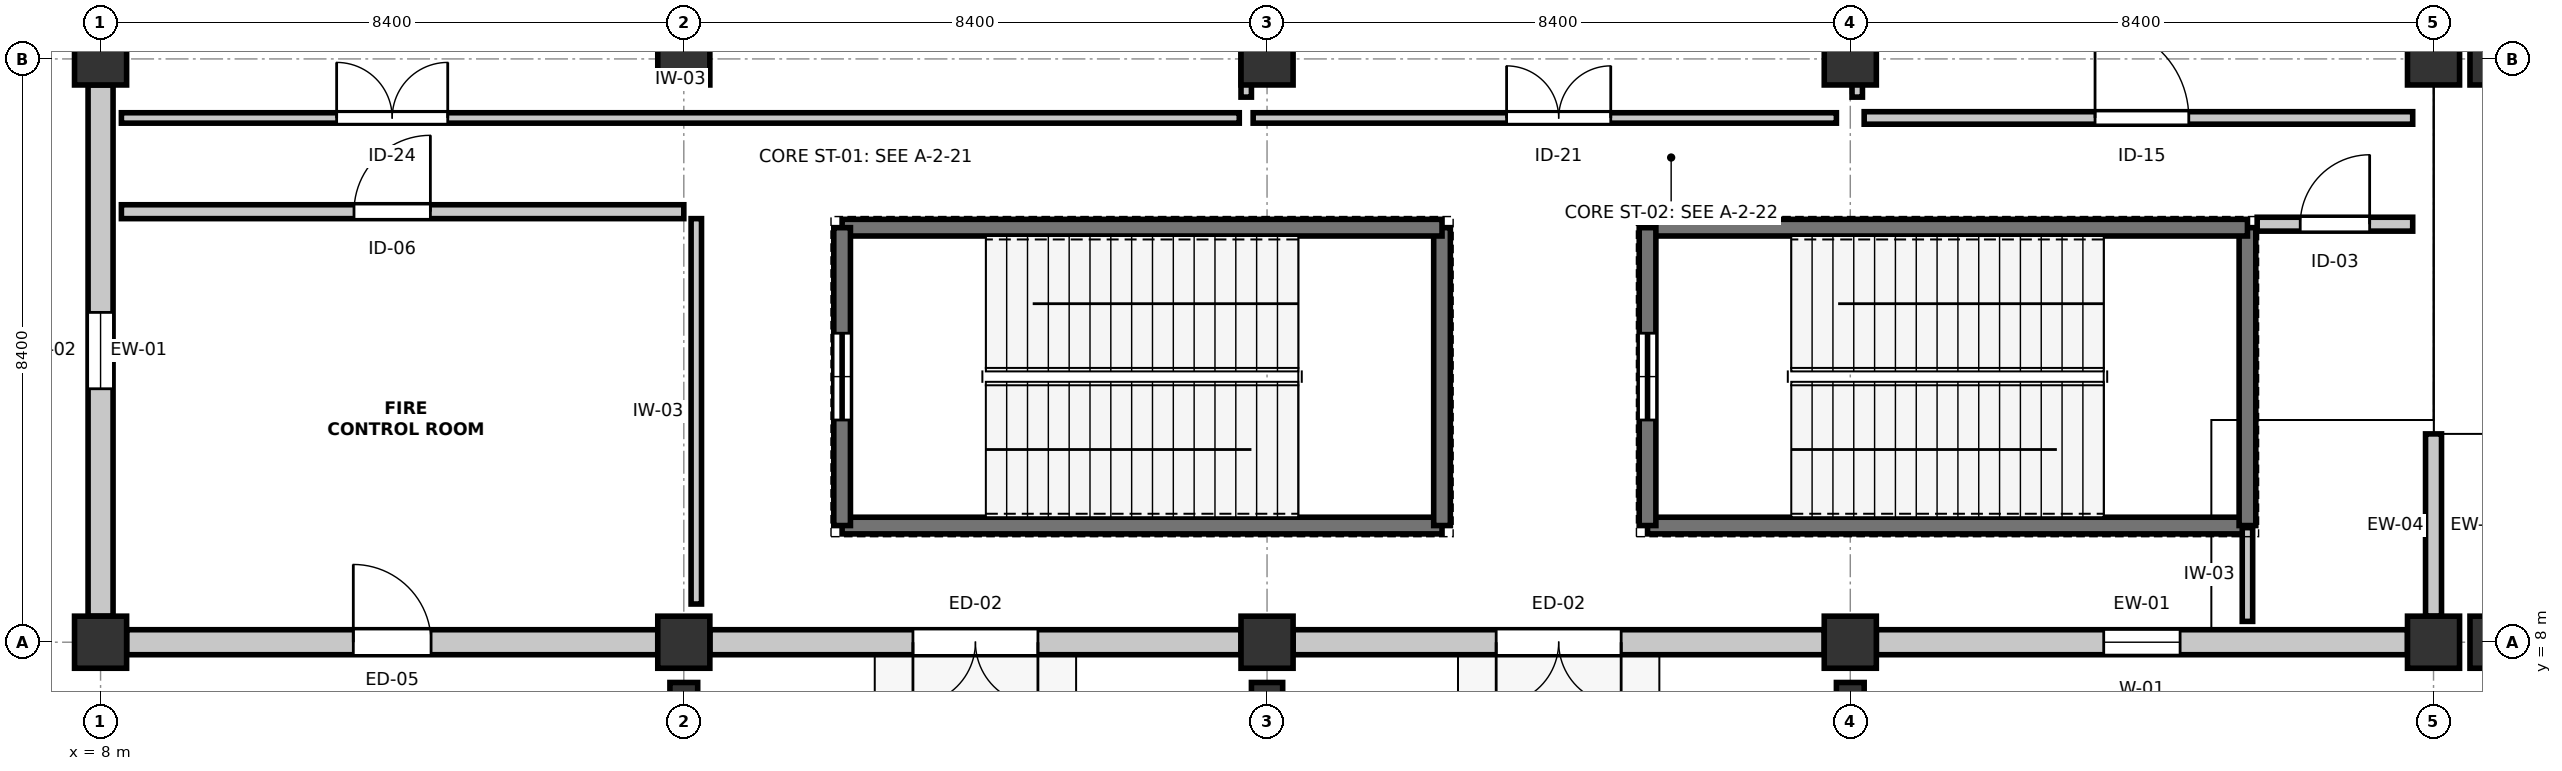
"""IFC4 building model, lengths in metres.
Left out: names, types, materials, properties, quantities, classifications, styles, units other than length and angle.
Written with IfcOpenShell. Run it as: python <this file> out.ifc"""

import sys

from ifc_helpers import new_model, si_unit, direction, frame, frame_2d, origin, origin_2d, place, context, subcontext, project, spatial, rectangle, extrude, element, fill, save


model = new_model("IFC4")
c1 = context("Model", 3, precision=1e-05, world=origin(), true_north=direction((0.0, 1.0)))
c2 = subcontext(c1, "Body", "Model", "MODEL_VIEW")
j1 = project(units=[si_unit("LENGTHUNIT", "METRE"), si_unit("PLANEANGLEUNIT", "RADIAN")], contexts=[c1])
p1 = place(None, origin())
s1 = spatial("IfcSite", under=j1, at=p1, CompositionType="ELEMENT")
p2 = place(p1, origin())
s2 = spatial("IfcBuilding", under=s1, at=p2, CompositionType="ELEMENT")
p3 = place(p2, origin())
s3 = spatial("IfcBuildingStorey", under=s2, at=p3, CompositionType="ELEMENT", Elevation=0.0)
for number, where, z_axis, x_axis in (
    (1, (8.0, 8.0, 0.0), (0.0, 0.0, 1.0), (1.0, 0.0, 0.0)),
    (2, (8.0, 16.4, 0.0), (0.0, 0.0, 1.0), (1.0, 0.0, 0.0)),
    (3, (16.4, 8.0, 0.0), (0.0, 0.0, 1.0), (1.0, 0.0, 0.0)),
):
    element("IfcColumn", number, at=place(p3, frame(where, z_axis=z_axis, x_axis=x_axis)), inside=s3, PredefinedType="COLUMN", context=c2, shape_type="SweptSolid", body=[
        extrude(rectangle(XDim=0.75, YDim=0.75, at=origin_2d()), origin(), (0.0, 0.0, 1.0), 4.8),
    ])
p4 = place(p3, frame((16.4, 7.095, 0.0), z_axis=(0.0, 0.0, 1.0), x_axis=(1.0, 0.0, 0.0)))
e4 = element("IfcColumn", 4, at=p4, inside=s3, PredefinedType="PILASTER", context=c2, shape_type="SweptSolid", body=[
    extrude(rectangle(XDim=0.4, YDim=0.65, at=origin_2d()), origin(), (0.0, 0.0, 1.0), 4.8),
])
for number, where, z_axis, x_axis in (
    (5, (16.4, 16.4, 0.0), (0.0, 0.0, 1.0), (1.0, 0.0, 0.0)),
    (6, (24.8, 8.0, 0.0), (0.0, 0.0, 1.0), (1.0, 0.0, 0.0)),
):
    element("IfcColumn", number, at=place(p3, frame(where, z_axis=z_axis, x_axis=x_axis)), inside=s3, PredefinedType="COLUMN", context=c2, shape_type="SweptSolid", body=[
        extrude(rectangle(XDim=0.75, YDim=0.75, at=origin_2d()), origin(), (0.0, 0.0, 1.0), 4.8),
    ])
p5 = place(p3, frame((24.8, 7.045, 0.0), z_axis=(0.0, 0.0, 1.0), x_axis=(1.0, 0.0, 0.0)))
e7 = element("IfcColumn", 7, at=p5, inside=s3, PredefinedType="PILASTER", context=c2, shape_type="SweptSolid", body=[
    extrude(rectangle(XDim=0.45, YDim=0.75, at=origin_2d()), origin(), (0.0, 0.0, 1.0), 4.8),
])
for number, where, z_axis, x_axis in (
    (8, (24.8, 16.4, 0.0), (0.0, 0.0, 1.0), (1.0, 0.0, 0.0)),
    (9, (33.2, 8.0, 0.0), (0.0, 0.0, 1.0), (1.0, 0.0, 0.0)),
):
    element("IfcColumn", number, at=place(p3, frame(where, z_axis=z_axis, x_axis=x_axis)), inside=s3, PredefinedType="COLUMN", context=c2, shape_type="SweptSolid", body=[
        extrude(rectangle(XDim=0.75, YDim=0.75, at=origin_2d()), origin(), (0.0, 0.0, 1.0), 4.8),
    ])
p6 = place(p3, frame((33.2, 7.095, 0.0), z_axis=(0.0, 0.0, 1.0), x_axis=(1.0, 0.0, 0.0)))
e10 = element("IfcColumn", 10, at=p6, inside=s3, PredefinedType="PILASTER", context=c2, shape_type="SweptSolid", body=[
    extrude(rectangle(XDim=0.4, YDim=0.65, at=origin_2d()), origin(), (0.0, 0.0, 1.0), 4.8),
])
for number, where, z_axis, x_axis in (
    (11, (33.2, 16.4, 0.0), (0.0, 0.0, 1.0), (1.0, 0.0, 0.0)),
    (12, (41.6, 8.0, 0.0), (0.0, 0.0, 1.0), (1.0, 0.0, 0.0)),
    (13, (41.6, 16.4, 0.0), (0.0, 0.0, 1.0), (1.0, 0.0, 0.0)),
    (14, (42.5, 8.0, 0.0), (0.0, 0.0, 1.0), (1.0, 0.0, 0.0)),
    (15, (42.5, 16.4, 0.0), (0.0, 0.0, 1.0), (1.0, 0.0, 0.0)),
):
    element("IfcColumn", number, at=place(p3, frame(where, z_axis=z_axis, x_axis=x_axis)), inside=s3, PredefinedType="COLUMN", context=c2, shape_type="SweptSolid", body=[
        extrude(rectangle(XDim=0.75, YDim=0.75, at=origin_2d()), origin(), (0.0, 0.0, 1.0), 4.8),
    ])
p7 = place(p3, frame((8.375, 8.0, 0.0), z_axis=(0.0, 0.0, 1.0), x_axis=(1.0, 0.0, 0.0)))
e16 = element("IfcWall", 16, at=p7, inside=s3, PredefinedType="STANDARD", context=c2, shape_type="SweptSolid", body=[
    extrude(rectangle(XDim=7.65, YDim=0.36, at=frame_2d((3.825, 0.0))), origin(), (0.0, 0.0, 1.0), 3.715),
])
p8 = place(p7, frame((3.265, 0.0, 0.0)))
e17 = element("IfcOpeningElement", 17, at=p8, cuts=e16, PredefinedType="OPENING", context=c2, shape_type="SweptSolid", body=[
    extrude(rectangle(XDim=1.12, YDim=2.18, at=frame_2d((0.56, 1.09))), frame((0.0, 0.19, 0.0), z_axis=(0.0, -1.0, 0.0), x_axis=(1.0, 0.0, 0.0)), (0.0, 0.0, 1.0), 0.38),
])
p9 = place(p3, frame((24.425, 8.0, 0.0), z_axis=(0.0, 0.0, 1.0), x_axis=(-1.0, 0.0, 0.0)))
e18 = element("IfcWall", 18, at=p9, inside=s3, PredefinedType="STANDARD", context=c2, shape_type="SweptSolid", body=[
    extrude(rectangle(XDim=7.65, YDim=0.36, at=frame_2d((3.825, 0.0))), origin(), (0.0, 0.0, 1.0), 3.785),
])
p10 = place(p9, frame((2.925, 0.0, 0.0)))
e19 = element("IfcOpeningElement", 19, at=p10, cuts=e18, PredefinedType="OPENING", context=c2, shape_type="SweptSolid", body=[
    extrude(rectangle(XDim=1.8, YDim=2.25, at=frame_2d((0.9, 1.125))), frame((0.0, 0.19, 0.0), z_axis=(0.0, -1.0, 0.0), x_axis=(1.0, 0.0, 0.0)), (0.0, 0.0, 1.0), 0.38),
])
p11 = place(p3, frame((32.825, 8.0, 0.0), z_axis=(0.0, 0.0, 1.0), x_axis=(-1.0, 0.0, 0.0)))
e20 = element("IfcWall", 20, at=p11, inside=s3, PredefinedType="STANDARD", context=c2, shape_type="SweptSolid", body=[
    extrude(rectangle(XDim=7.65, YDim=0.36, at=frame_2d((3.825, 0.0))), origin(), (0.0, 0.0, 1.0), 3.785),
])
p12 = place(p11, frame((2.925, 0.0, 0.0)))
e21 = element("IfcOpeningElement", 21, at=p12, cuts=e20, PredefinedType="OPENING", context=c2, shape_type="SweptSolid", body=[
    extrude(rectangle(XDim=1.8, YDim=2.25, at=frame_2d((0.9, 1.125))), frame((0.0, 0.19, 0.0), z_axis=(0.0, -1.0, 0.0), x_axis=(1.0, 0.0, 0.0)), (0.0, 0.0, 1.0), 0.38),
])
p13 = place(p3, frame((33.575, 8.0, 0.0), z_axis=(0.0, 0.0, 1.0), x_axis=(1.0, 0.0, 0.0)))
e22 = element("IfcWall", 22, at=p13, inside=s3, PredefinedType="STANDARD", context=c2, shape_type="SweptSolid", body=[
    extrude(rectangle(XDim=7.65, YDim=0.36, at=frame_2d((3.825, 0.0))), origin(), (0.0, 0.0, 1.0), 3.785),
])
p14 = place(p13, frame((3.275, 0.0, 0.95)))
e23 = element("IfcOpeningElement", 23, at=p14, cuts=e22, PredefinedType="OPENING", context=c2, shape_type="SweptSolid", body=[
    extrude(rectangle(XDim=1.1, YDim=1.45, at=frame_2d((0.55, 0.725))), frame((0.0, 0.19, 0.0), z_axis=(0.0, -1.0, 0.0), x_axis=(1.0, 0.0, 0.0)), (0.0, 0.0, 1.0), 0.38),
])
p15 = place(p3, frame((41.6, 8.375, 0.0), z_axis=(0.0, 0.0, 1.0), x_axis=(0.0, 1.0, 0.0)))
e24 = element("IfcWall", 24, at=p15, inside=s3, PredefinedType="STANDARD", context=c2, shape_type="SweptSolid", body=[
    extrude(rectangle(XDim=2.625, YDim=0.23, at=frame_2d((1.312, 0.0))), origin(), (0.0, 0.0, 1.0), 3.785),
])
p16 = place(p3, frame((8.0, 16.025, 0.0), z_axis=(0.0, 0.0, 1.0), x_axis=(0.0, -1.0, 0.0)))
e25 = element("IfcWall", 25, at=p16, inside=s3, PredefinedType="STANDARD", context=c2, shape_type="SweptSolid", body=[
    extrude(rectangle(XDim=7.65, YDim=0.36, at=frame_2d((3.825, 0.0))), origin(), (0.0, 0.0, 1.0), 3.715),
])
p17 = place(p16, frame((3.275, 0.0, 0.95)))
e26 = element("IfcOpeningElement", 26, at=p17, cuts=e25, PredefinedType="OPENING", context=c2, shape_type="SweptSolid", body=[
    extrude(rectangle(XDim=1.1, YDim=1.7, at=frame_2d((0.55, 0.85))), frame((0.0, 0.19, 0.0), z_axis=(0.0, -1.0, 0.0), x_axis=(1.0, 0.0, 0.0)), (0.0, 0.0, 1.0), 0.38),
])
p18 = place(p3, frame((18.68, 9.68, 0.0), z_axis=(0.0, 0.0, 1.0), x_axis=(1.0, 0.0, 0.0)))
e27 = element("IfcWall", 27, at=p18, inside=s3, PredefinedType="SHEAR", context=c2, shape_type="SweptSolid", body=[
    extrude(rectangle(XDim=8.64, YDim=0.24, at=frame_2d((4.32, 0.0))), origin(), (0.0, 0.0, 1.0), 4.55),
])
p19 = place(p3, frame((27.32, 9.68, 0.0), z_axis=(0.0, 0.0, 1.0), x_axis=(0.0, 1.0, 0.0)))
e28 = element("IfcWall", 28, at=p19, inside=s3, PredefinedType="SHEAR", context=c2, shape_type="SweptSolid", body=[
    extrude(rectangle(XDim=4.29, YDim=0.24, at=frame_2d((2.145, 0.0))), origin(), (0.0, 0.0, 1.0), 4.55),
])
p20 = place(p3, frame((27.32, 13.97, 0.0), z_axis=(0.0, 0.0, 1.0), x_axis=(-1.0, 0.0, 0.0)))
e29 = element("IfcWall", 29, at=p20, inside=s3, PredefinedType="SHEAR", context=c2, shape_type="SweptSolid", body=[
    extrude(rectangle(XDim=8.64, YDim=0.24, at=frame_2d((4.32, 0.0))), origin(), (0.0, 0.0, 1.0), 4.55),
])
p21 = place(p3, frame((18.68, 13.97, 0.0), z_axis=(0.0, 0.0, 1.0), x_axis=(0.0, -1.0, 0.0)))
e30 = element("IfcWall", 30, at=p21, inside=s3, PredefinedType="SHEAR", context=c2, shape_type="SweptSolid", body=[
    extrude(rectangle(XDim=4.29, YDim=0.24, at=frame_2d((2.145, 0.0))), origin(), (0.0, 0.0, 1.0), 4.55),
])
p22 = place(p21, frame((1.52, 0.0, 0.0)))
e31 = element("IfcOpeningElement", 31, at=p22, cuts=e30, PredefinedType="OPENING", context=c2, shape_type="SweptSolid", body=[
    extrude(rectangle(XDim=1.25, YDim=2.2, at=frame_2d((0.625, 1.1))), frame((0.0, 0.13, 0.0), z_axis=(0.0, -1.0, 0.0), x_axis=(1.0, 0.0, 0.0)), (0.0, 0.0, 1.0), 0.26),
])
p23 = place(p3, frame((30.28, 9.68, 0.0), z_axis=(0.0, 0.0, 1.0), x_axis=(1.0, 0.0, 0.0)))
e32 = element("IfcWall", 32, at=p23, inside=s3, PredefinedType="SHEAR", context=c2, shape_type="SweptSolid", body=[
    extrude(rectangle(XDim=8.64, YDim=0.24, at=frame_2d((4.32, 0.0))), origin(), (0.0, 0.0, 1.0), 4.55),
])
p24 = place(p3, frame((38.92, 9.68, 0.0), z_axis=(0.0, 0.0, 1.0), x_axis=(0.0, 1.0, 0.0)))
e33 = element("IfcWall", 33, at=p24, inside=s3, PredefinedType="SHEAR", context=c2, shape_type="SweptSolid", body=[
    extrude(rectangle(XDim=4.29, YDim=0.24, at=frame_2d((2.145, 0.0))), origin(), (0.0, 0.0, 1.0), 4.55),
])
p25 = place(p3, frame((38.92, 13.97, 0.0), z_axis=(0.0, 0.0, 1.0), x_axis=(-1.0, 0.0, 0.0)))
e34 = element("IfcWall", 34, at=p25, inside=s3, PredefinedType="SHEAR", context=c2, shape_type="SweptSolid", body=[
    extrude(rectangle(XDim=8.64, YDim=0.24, at=frame_2d((4.32, 0.0))), origin(), (0.0, 0.0, 1.0), 4.55),
])
p26 = place(p3, frame((30.28, 13.97, 0.0), z_axis=(0.0, 0.0, 1.0), x_axis=(0.0, -1.0, 0.0)))
e35 = element("IfcWall", 35, at=p26, inside=s3, PredefinedType="SHEAR", context=c2, shape_type="SweptSolid", body=[
    extrude(rectangle(XDim=4.29, YDim=0.24, at=frame_2d((2.145, 0.0))), origin(), (0.0, 0.0, 1.0), 4.55),
])
p27 = place(p26, frame((1.52, 0.0, 0.0)))
e36 = element("IfcOpeningElement", 36, at=p27, cuts=e35, PredefinedType="OPENING", context=c2, shape_type="SweptSolid", body=[
    extrude(rectangle(XDim=1.25, YDim=2.2, at=frame_2d((0.625, 1.1))), frame((0.0, 0.13, 0.0), z_axis=(0.0, -1.0, 0.0), x_axis=(1.0, 0.0, 0.0)), (0.0, 0.0, 1.0), 0.26),
])
p28 = place(p3, frame((8.3, 14.2, 0.0), z_axis=(0.0, 0.0, 1.0), x_axis=(1.0, 0.0, 0.0)))
e37 = element("IfcWall", 37, at=p28, inside=s3, PredefinedType="PARTITIONING", context=c2, shape_type="SweptSolid", body=[
    extrude(rectangle(XDim=8.1, YDim=0.2, at=frame_2d((4.05, 0.0))), origin(), (0.0, 0.0, 1.0), 3.715),
])
p29 = place(p28, frame((3.35, 0.0, 0.0)))
e38 = element("IfcOpeningElement", 38, at=p29, cuts=e37, PredefinedType="OPENING", context=c2, shape_type="SweptSolid", body=[
    extrude(rectangle(XDim=1.1, YDim=2.16, at=frame_2d((0.55, 1.08))), frame((0.0, 0.11, 0.0), z_axis=(0.0, -1.0, 0.0), x_axis=(1.0, 0.0, 0.0)), (0.0, 0.0, 1.0), 0.22),
])
p30 = place(p3, frame((16.58, 8.55, 0.0), z_axis=(0.0, 0.0, 1.0), x_axis=(0.0, 1.0, 0.0)))
e39 = element("IfcWall", 39, at=p30, inside=s3, PredefinedType="PARTITIONING", context=c2, shape_type="SweptSolid", body=[
    extrude(rectangle(XDim=5.55, YDim=0.15, at=frame_2d((2.775, 0.0))), origin(), (0.0, 0.0, 1.0), 3.715),
])
p31 = place(p3, frame((8.3, 15.55, 0.0), z_axis=(0.0, 0.0, 1.0), x_axis=(1.0, 0.0, 0.0)))
e40 = element("IfcWall", 40, at=p31, inside=s3, PredefinedType="PARTITIONING", context=c2, shape_type="SweptSolid", body=[
    extrude(rectangle(XDim=16.1, YDim=0.15, at=frame_2d((8.05, 0.0))), origin(), (0.0, 0.0, 1.0), 3.715),
])
p32 = place(p31, frame((3.1, 0.0, 0.0)))
e41 = element("IfcOpeningElement", 41, at=p32, cuts=e40, PredefinedType="OPENING", context=c2, shape_type="SweptSolid", body=[
    extrude(rectangle(XDim=1.6, YDim=2.28, at=frame_2d((0.8, 1.14))), frame((0.0, 0.085, 0.0), z_axis=(0.0, -1.0, 0.0), x_axis=(1.0, 0.0, 0.0)), (0.0, 0.0, 1.0), 0.17),
])
p33 = place(p3, frame((24.6, 15.55, 0.0), z_axis=(0.0, 0.0, 1.0), x_axis=(1.0, 0.0, 0.0)))
e42 = element("IfcWall", 42, at=p33, inside=s3, PredefinedType="PARTITIONING", context=c2, shape_type="SweptSolid", body=[
    extrude(rectangle(XDim=8.4, YDim=0.15, at=frame_2d((4.2, 0.0))), origin(), (0.0, 0.0, 1.0), 4.535),
])
p34 = place(p33, frame((3.65, 0.0, 0.0)))
e43 = element("IfcOpeningElement", 43, at=p34, cuts=e42, PredefinedType="OPENING", context=c2, shape_type="SweptSolid", body=[
    extrude(rectangle(XDim=1.5, YDim=2.24, at=frame_2d((0.75, 1.12))), frame((0.0, 0.085, 0.0), z_axis=(0.0, -1.0, 0.0), x_axis=(1.0, 0.0, 0.0)), (0.0, 0.0, 1.0), 0.17),
])
p35 = place(p3, frame((24.5, 15.85, 0.0), z_axis=(0.0, 0.0, 1.0), x_axis=(0.0, 1.0, 0.0)))
e44 = element("IfcWall", 44, at=p35, inside=s3, PredefinedType="PARTITIONING", context=c2, shape_type="SweptSolid", body=[
    extrude(rectangle(XDim=8.65, YDim=0.15, at=frame_2d((4.325, 0.0))), origin(), (0.0, 0.0, 1.0), 3.685),
])
p36 = place(p3, frame((33.4, 15.55, 0.0), z_axis=(0.0, 0.0, 1.0), x_axis=(1.0, 0.0, 0.0)))
e45 = element("IfcWall", 45, at=p36, inside=s3, PredefinedType="PARTITIONING", context=c2, shape_type="SweptSolid", body=[
    extrude(rectangle(XDim=7.9, YDim=0.18, at=frame_2d((3.95, 0.0))), origin(), (0.0, 0.0, 1.0), 3.785),
])
p37 = place(p36, frame((3.325, 0.0, 0.0)))
e46 = element("IfcOpeningElement", 46, at=p37, cuts=e45, PredefinedType="OPENING", context=c2, shape_type="SweptSolid", body=[
    extrude(rectangle(XDim=1.35, YDim=2.2, at=frame_2d((0.675, 1.1))), frame((0.0, 0.1, 0.0), z_axis=(0.0, -1.0, 0.0), x_axis=(1.0, 0.0, 0.0)), (0.0, 0.0, 1.0), 0.2),
])
p38 = place(p3, frame((33.3, 15.85, 0.0), z_axis=(0.0, 0.0, 1.0), x_axis=(0.0, 1.0, 0.0)))
e47 = element("IfcWall", 47, at=p38, inside=s3, PredefinedType="PARTITIONING", context=c2, shape_type="SweptSolid", body=[
    extrude(rectangle(XDim=8.65, YDim=0.15, at=frame_2d((4.325, 0.0))), origin(), (0.0, 0.0, 1.0), 3.715),
])
p39 = place(p3, frame((39.06, 14.02, 0.0), z_axis=(0.0, 0.0, 1.0), x_axis=(1.0, 0.0, 0.0)))
e48 = element("IfcWall", 48, at=p39, inside=s3, PredefinedType="PARTITIONING", context=c2, shape_type="SweptSolid", body=[
    extrude(rectangle(XDim=2.24, YDim=0.2, at=frame_2d((1.12, 0.0))), origin(), (0.0, 0.0, 1.0), 3.785),
])
p40 = place(p39, frame((0.62, 0.0, 0.0)))
e49 = element("IfcOpeningElement", 49, at=p40, cuts=e48, PredefinedType="OPENING", context=c2, shape_type="SweptSolid", body=[
    extrude(rectangle(XDim=1.0, YDim=2.15, at=frame_2d((0.5, 1.075))), frame((0.0, 0.11, 0.0), z_axis=(0.0, -1.0, 0.0), x_axis=(1.0, 0.0, 0.0)), (0.0, 0.0, 1.0), 0.22),
])
p41 = place(p3, frame((38.92, 8.3, 0.0), z_axis=(0.0, 0.0, 1.0), x_axis=(0.0, 1.0, 0.0)))
e50 = element("IfcWall", 50, at=p41, inside=s3, PredefinedType="PARTITIONING", context=c2, shape_type="SweptSolid", body=[
    extrude(rectangle(XDim=1.35, YDim=0.15, at=frame_2d((0.675, 0.0))), origin(), (0.0, 0.0, 1.0), 4.535),
])
p42 = place(p8, origin())
e51 = element("IfcDoor", 51, at=p42, inside=s3, OperationType="SINGLE_SWING_LEFT", PredefinedType="DOOR", context=c2, shape_type="SweptSolid", body=[
    extrude(rectangle(XDim=1.12, YDim=2.18, at=frame_2d((0.56, 1.09))), frame((0.0, 0.025, 0.0), z_axis=(0.0, -1.0, 0.0), x_axis=(1.0, 0.0, 0.0)), (0.0, 0.0, 1.0), 0.05),
])
fill(e17, e51)
p43 = place(p10, origin())
e52 = element("IfcDoor", 52, at=p43, inside=s3, OperationType="DOUBLE_DOOR_SINGLE_SWING", PredefinedType="DOOR", context=c2, shape_type="SweptSolid", body=[
    extrude(rectangle(XDim=1.8, YDim=2.25, at=frame_2d((0.9, 1.125))), frame((0.0, 0.025, 0.0), z_axis=(0.0, -1.0, 0.0), x_axis=(1.0, 0.0, 0.0)), (0.0, 0.0, 1.0), 0.05),
])
fill(e19, e52)
p44 = place(p12, origin())
e53 = element("IfcDoor", 53, at=p44, inside=s3, OperationType="DOUBLE_DOOR_SINGLE_SWING", PredefinedType="DOOR", context=c2, shape_type="SweptSolid", body=[
    extrude(rectangle(XDim=1.8, YDim=2.25, at=frame_2d((0.9, 1.125))), frame((0.0, 0.025, 0.0), z_axis=(0.0, -1.0, 0.0), x_axis=(1.0, 0.0, 0.0)), (0.0, 0.0, 1.0), 0.05),
])
fill(e21, e53)
p45 = place(p14, origin())
e54 = element("IfcWindow", 54, at=p45, inside=s3, PartitioningType="SINGLE_PANEL", PredefinedType="WINDOW", context=c2, shape_type="SweptSolid", body=[
    extrude(rectangle(XDim=1.1, YDim=1.45, at=frame_2d((0.55, 0.725))), frame((0.0, 0.03, 0.0), z_axis=(0.0, -1.0, 0.0), x_axis=(1.0, 0.0, 0.0)), (0.0, 0.0, 1.0), 0.06),
])
fill(e23, e54)
p46 = place(p17, origin())
e55 = element("IfcWindow", 55, at=p46, inside=s3, PartitioningType="SINGLE_PANEL", PredefinedType="WINDOW", context=c2, shape_type="SweptSolid", body=[
    extrude(rectangle(XDim=1.1, YDim=1.7, at=frame_2d((0.55, 0.85))), frame((0.0, 0.03, 0.0), z_axis=(0.0, -1.0, 0.0), x_axis=(1.0, 0.0, 0.0)), (0.0, 0.0, 1.0), 0.06),
])
fill(e26, e55)
p47 = place(p22, origin())
e56 = element("IfcDoor", 56, at=p47, inside=s3, OperationType="SINGLE_SWING_RIGHT", PredefinedType="DOOR", context=c2, shape_type="SweptSolid", body=[
    extrude(rectangle(XDim=1.25, YDim=2.2, at=frame_2d((0.625, 1.1))), frame((0.0, 0.025, 0.0), z_axis=(0.0, -1.0, 0.0), x_axis=(1.0, 0.0, 0.0)), (0.0, 0.0, 1.0), 0.05),
])
fill(e31, e56)
p48 = place(p27, origin())
e57 = element("IfcDoor", 57, at=p48, inside=s3, OperationType="SINGLE_SWING_RIGHT", PredefinedType="DOOR", context=c2, shape_type="SweptSolid", body=[
    extrude(rectangle(XDim=1.25, YDim=2.2, at=frame_2d((0.625, 1.1))), frame((0.0, 0.025, 0.0), z_axis=(0.0, -1.0, 0.0), x_axis=(1.0, 0.0, 0.0)), (0.0, 0.0, 1.0), 0.05),
])
fill(e36, e57)
p49 = place(p29, origin())
e58 = element("IfcDoor", 58, at=p49, inside=s3, OperationType="SINGLE_SWING_RIGHT", PredefinedType="DOOR", context=c2, shape_type="SweptSolid", body=[
    extrude(rectangle(XDim=1.1, YDim=2.16, at=frame_2d((0.55, 1.08))), frame((0.0, 0.025, 0.0), z_axis=(0.0, -1.0, 0.0), x_axis=(1.0, 0.0, 0.0)), (0.0, 0.0, 1.0), 0.05),
])
fill(e38, e58)
p50 = place(p32, origin())
e59 = element("IfcDoor", 59, at=p50, inside=s3, OperationType="DOUBLE_DOOR_SINGLE_SWING", PredefinedType="DOOR", context=c2, shape_type="SweptSolid", body=[
    extrude(rectangle(XDim=1.6, YDim=2.28, at=frame_2d((0.8, 1.14))), frame((0.0, 0.025, 0.0), z_axis=(0.0, -1.0, 0.0), x_axis=(1.0, 0.0, 0.0)), (0.0, 0.0, 1.0), 0.05),
])
fill(e41, e59)
p51 = place(p34, origin())
e60 = element("IfcDoor", 60, at=p51, inside=s3, OperationType="DOUBLE_DOOR_SINGLE_SWING", PredefinedType="DOOR", context=c2, shape_type="SweptSolid", body=[
    extrude(rectangle(XDim=1.5, YDim=2.24, at=frame_2d((0.75, 1.12))), frame((0.0, 0.025, 0.0), z_axis=(0.0, -1.0, 0.0), x_axis=(1.0, 0.0, 0.0)), (0.0, 0.0, 1.0), 0.05),
])
fill(e43, e60)
p52 = place(p37, origin())
e61 = element("IfcDoor", 61, at=p52, inside=s3, OperationType="SINGLE_SWING_LEFT", PredefinedType="DOOR", context=c2, shape_type="SweptSolid", body=[
    extrude(rectangle(XDim=1.35, YDim=2.2, at=frame_2d((0.675, 1.1))), frame((0.0, 0.025, 0.0), z_axis=(0.0, -1.0, 0.0), x_axis=(1.0, 0.0, 0.0)), (0.0, 0.0, 1.0), 0.05),
])
fill(e46, e61)
p53 = place(p40, origin())
e62 = element("IfcDoor", 62, at=p53, inside=s3, OperationType="SINGLE_SWING_RIGHT", PredefinedType="DOOR", context=c2, shape_type="SweptSolid", body=[
    extrude(rectangle(XDim=1.0, YDim=2.15, at=frame_2d((0.5, 1.075))), frame((0.0, 0.025, 0.0), z_axis=(0.0, -1.0, 0.0), x_axis=(1.0, 0.0, 0.0)), (0.0, 0.0, 1.0), 0.05),
])
fill(e49, e62)
save(model, sys.argv[1])
